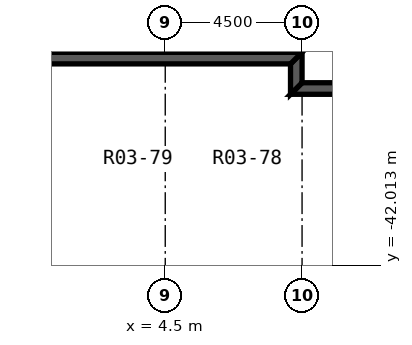
"""IFC4 building model, lengths in metres.
Left out: names, types, materials, properties, quantities, classifications, styles, units other than length and angle.
Written with IfcOpenShell. Run it as: python <this file> out.ifc"""

import sys

from ifc_helpers import new_model, si_unit, direction, frame, origin, place, context, subcontext, project, spatial, polyline, outline, extrude, element, save


model = new_model("IFC4")
c1 = context("Model", 3, precision=1e-05, world=origin(), true_north=direction((0.0, 1.0)))
c2 = subcontext(c1, "Body", "Model", "MODEL_VIEW")
j1 = project(units=[si_unit("LENGTHUNIT", "METRE"), si_unit("PLANEANGLEUNIT", "RADIAN")], contexts=[c1])
p1 = place(None, origin())
s1 = spatial("IfcSite", under=j1, at=p1, CompositionType="ELEMENT")
p2 = place(p1, origin())
s2 = spatial("IfcBuilding", under=s1, at=p2, CompositionType="ELEMENT")
p3 = place(p2, origin())
s3 = spatial("IfcBuildingStorey", under=s2, at=p3, CompositionType="ELEMENT", Elevation=0.0)
p4 = place(p3, frame((0.0, 0.0, -1.0)))
e1 = element("IfcWall", 1, at=p4, inside=s3, PredefinedType="SOLIDWALL", context=c2, shape_type="SweptSolid", body=[
    extrude(outline(polyline([(24.0, -36.0), (9.0, -36.0), (8.62, -36.38), (23.62, -36.38), (24.0, -36.0)])), origin(), (0.0, 0.0, 1.0), 0.85),
])
p5 = place(p3, frame((0.0, 0.0, -1.0)))
e2 = element("IfcWall", 2, at=p5, inside=s3, PredefinedType="SOLIDWALL", context=c2, shape_type="SweptSolid", body=[
    extrude(outline(polyline([(9.0, -36.0), (9.0, -35.0), (8.62, -35.38), (8.62, -36.38), (9.0, -36.0)])), origin(), (0.0, 0.0, 1.0), 0.85),
])
p6 = place(p3, frame((0.0, 0.0, -1.0)))
e3 = element("IfcWall", 3, at=p6, inside=s3, PredefinedType="SOLIDWALL", context=c2, shape_type="SweptSolid", body=[
    extrude(outline(polyline([(9.0, -35.0), (-9.0, -35.0), (-8.62, -35.38), (8.62, -35.38), (9.0, -35.0)])), origin(), (0.0, 0.0, 1.0), 0.85),
])
save(model, sys.argv[1])
